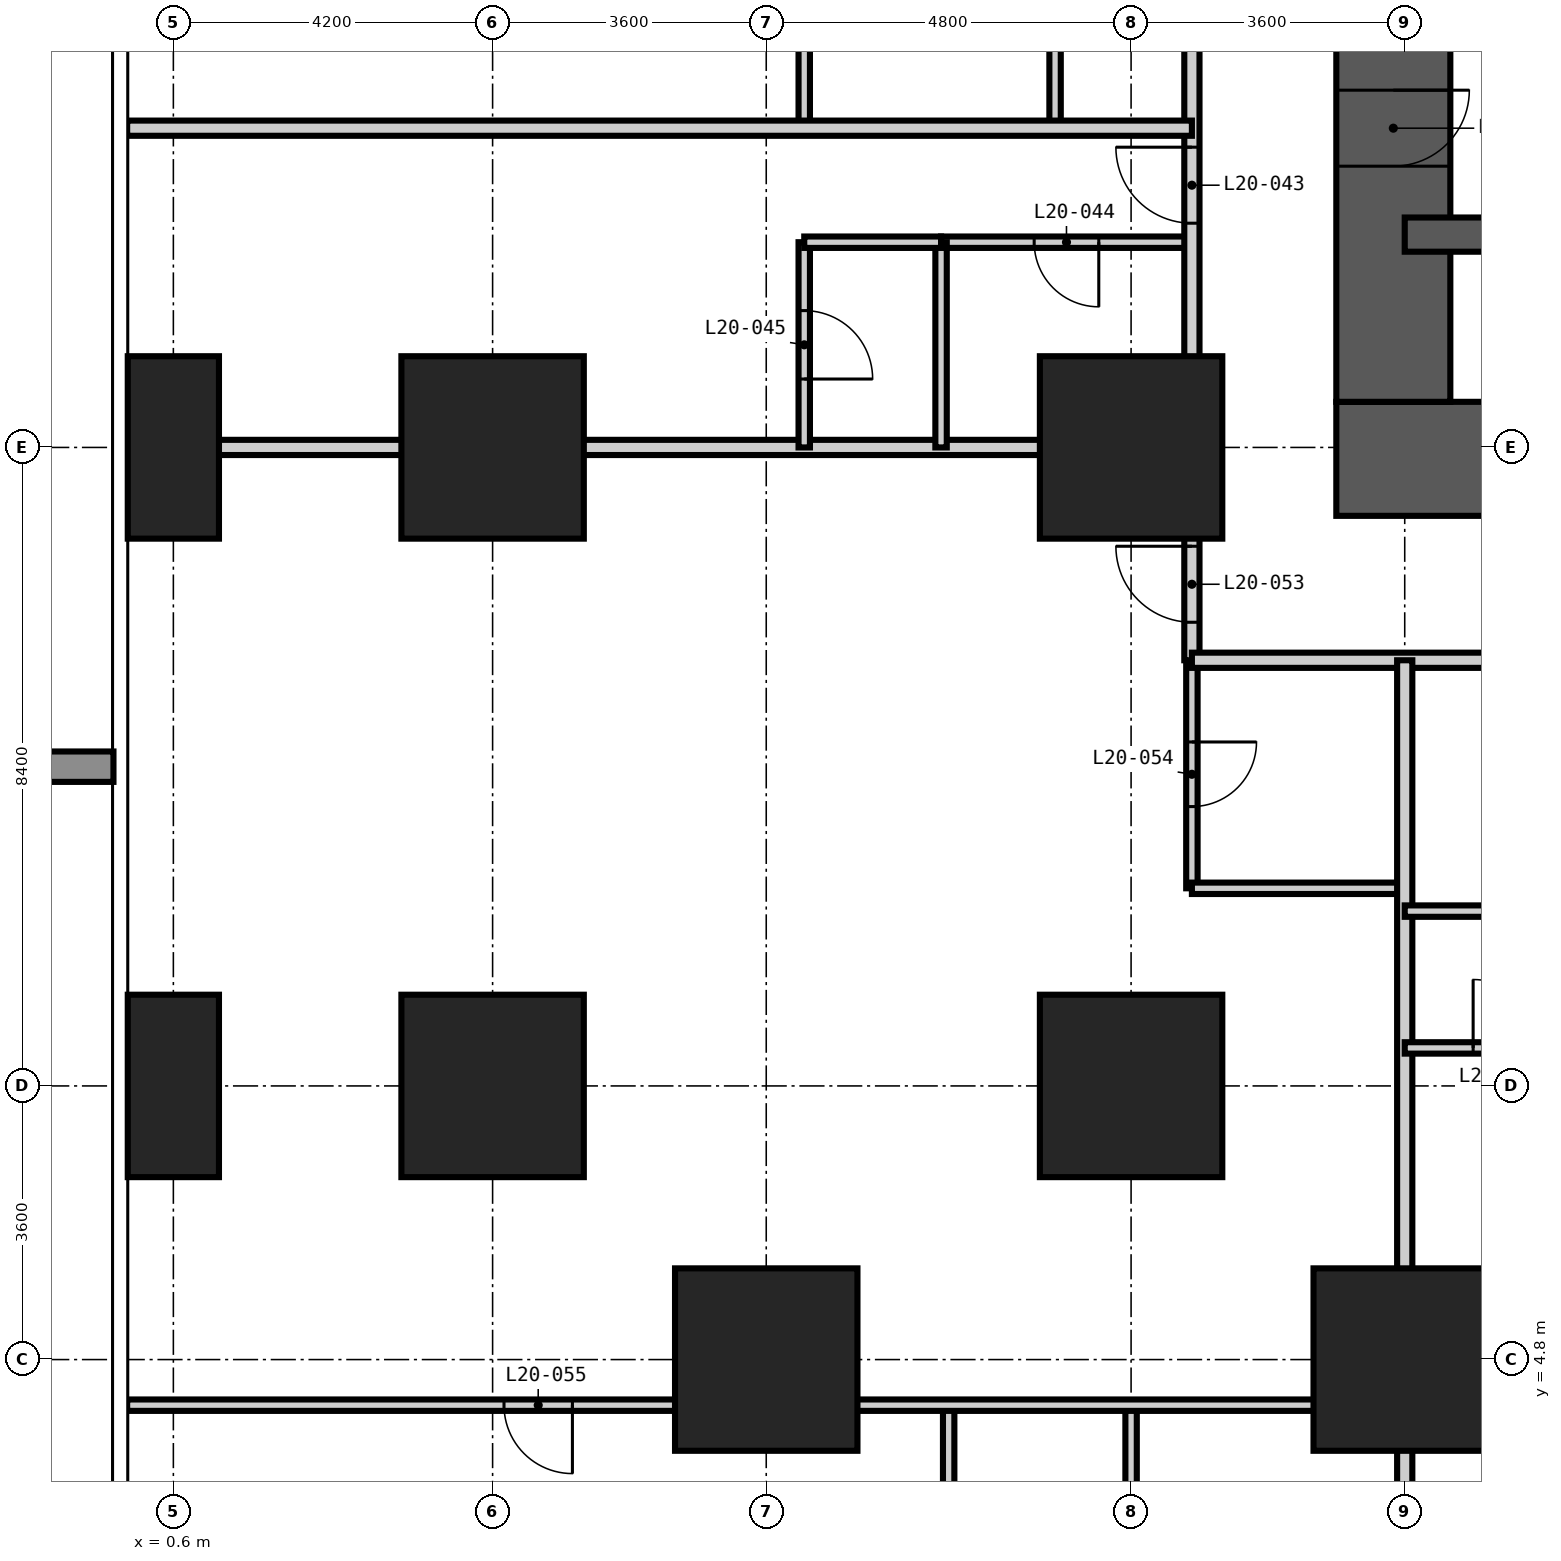
"""IFC4 building model, lengths in metres.
Left out: names, types, materials, properties, quantities, classifications, styles, units other than length and angle.
Written with IfcOpenShell. Run it as: python <this file> out.ifc"""

import sys

from ifc_helpers import new_model, si_unit, direction, frame, frame_2d, origin, origin_2d, place, context, subcontext, project, spatial, rectangle, extrude, element, fill, save


model = new_model("IFC4")
c1 = context("Model", 3, precision=1e-05, world=origin(), true_north=direction((0.0, 1.0)))
c2 = subcontext(c1, "Body", "Model", "MODEL_VIEW")
j1 = project(units=[si_unit("LENGTHUNIT", "METRE"), si_unit("PLANEANGLEUNIT", "RADIAN")], contexts=[c1])
p1 = place(None, origin())
s1 = spatial("IfcSite", under=j1, at=p1, CompositionType="ELEMENT")
p2 = place(p1, origin())
s2 = spatial("IfcBuilding", under=s1, at=p2, CompositionType="ELEMENT")
p3 = place(p2, frame((0.0, 0.0, 81.0)))
s3 = spatial("IfcBuildingStorey", under=s2, at=p3, CompositionType="ELEMENT", Elevation=81.0)
for number, where, z_axis, x_axis in (
    (1, (0.6, 8.4, -0.35), (0.0, 0.0, 1.0), (1.0, 0.0, 0.0)),
    (2, (0.6, 16.8, -0.35), (0.0, 0.0, 1.0), (1.0, 0.0, 0.0)),
):
    element("IfcColumn", number, at=place(p3, frame(where, z_axis=z_axis, x_axis=x_axis)), inside=s3, PredefinedType="COLUMN", context=c2, shape_type="SweptSolid", body=[
        extrude(rectangle(XDim=1.2, YDim=2.4, at=origin_2d()), origin(), (0.0, 0.0, 1.0), 3.6),
    ])
for number, where, z_axis, x_axis in (
    (3, (4.8, 8.4, -0.35), (0.0, 0.0, 1.0), (1.0, 0.0, 0.0)),
    (4, (4.8, 16.8, -0.35), (0.0, 0.0, 1.0), (1.0, 0.0, 0.0)),
    (5, (8.4, 4.8, -0.35), (0.0, 0.0, 1.0), (1.0, 0.0, 0.0)),
    (6, (13.2, 8.4, -0.35), (0.0, 0.0, 1.0), (1.0, 0.0, 0.0)),
    (7, (13.2, 16.8, -0.35), (0.0, 0.0, 1.0), (1.0, 0.0, 0.0)),
    (8, (16.8, 4.8, -0.35), (0.0, 0.0, 1.0), (1.0, 0.0, 0.0)),
):
    element("IfcColumn", number, at=place(p3, frame(where, z_axis=z_axis, x_axis=x_axis)), inside=s3, PredefinedType="COLUMN", context=c2, shape_type="SweptSolid", body=[
        extrude(rectangle(XDim=2.4, YDim=2.4, at=origin_2d()), origin(), (0.0, 0.0, 1.0), 3.6),
    ])
p4 = place(p3, frame((15.9, 16.65, -0.35), z_axis=(0.0, 0.0, 1.0), x_axis=(1.0, 0.0, 0.0)))
e9 = element("IfcWall", 9, at=p4, inside=s3, PredefinedType="SHEAR", context=c2, shape_type="SweptSolid", body=[
    extrude(rectangle(XDim=27.0, YDim=1.5, at=frame_2d((13.5, 0.0))), origin(), (0.0, 0.0, 1.0), 3.6),
])
p5 = place(p4, frame((13.0, 0.0, 0.35)))
e10 = element("IfcOpeningElement", 10, at=p5, cuts=e9, PredefinedType="OPENING", context=c2, shape_type="SweptSolid", body=[
    extrude(rectangle(XDim=1.0, YDim=2.1, at=frame_2d((0.5, 1.05))), frame((0.0, 0.76, 0.0), z_axis=(0.0, -1.0, 0.0), x_axis=(1.0, 0.0, 0.0)), (0.0, 0.0, 1.0), 1.52),
])
p6 = place(p4, frame((19.3, 0.0, 0.35)))
e11 = element("IfcOpeningElement", 11, at=p6, cuts=e9, PredefinedType="OPENING", context=c2, shape_type="SweptSolid", body=[
    extrude(rectangle(XDim=1.0, YDim=2.1, at=frame_2d((0.5, 1.05))), frame((0.0, 0.76, 0.0), z_axis=(0.0, -1.0, 0.0), x_axis=(1.0, 0.0, 0.0)), (0.0, 0.0, 1.0), 1.52),
])
p7 = place(p3, frame((16.65, 41.4, -0.35), z_axis=(0.0, 0.0, 1.0), x_axis=(0.0, -1.0, 0.0)))
e12 = element("IfcWall", 12, at=p7, inside=s3, PredefinedType="SHEAR", context=c2, shape_type="SweptSolid", body=[
    extrude(rectangle(XDim=24.0, YDim=1.5, at=frame_2d((12.0, 0.0))), origin(), (0.0, 0.0, 1.0), 3.6),
])
p8 = place(p7, frame((11.1, 0.0, 0.35)))
e13 = element("IfcOpeningElement", 13, at=p8, cuts=e12, PredefinedType="OPENING", context=c2, shape_type="SweptSolid", body=[
    extrude(rectangle(XDim=1.8, YDim=2.2, at=frame_2d((0.9, 1.1))), frame((0.0, 0.76, 0.0), z_axis=(0.0, -1.0, 0.0), x_axis=(1.0, 0.0, 0.0)), (0.0, 0.0, 1.0), 1.52),
])
p9 = place(p7, frame((19.9, 0.0, 0.35)))
e14 = element("IfcOpeningElement", 14, at=p9, cuts=e12, PredefinedType="OPENING", context=c2, shape_type="SweptSolid", body=[
    extrude(rectangle(XDim=1.0, YDim=2.1, at=frame_2d((0.5, 1.05))), frame((0.0, 0.76, 0.0), z_axis=(0.0, -1.0, 0.0), x_axis=(1.0, 0.0, 0.0)), (0.0, 0.0, 1.0), 1.52),
])
p10 = place(p7, frame((5.2, 0.0, 0.35)))
e15 = element("IfcOpeningElement", 15, at=p10, cuts=e12, PredefinedType="OPENING", context=c2, shape_type="SweptSolid", body=[
    extrude(rectangle(XDim=1.0, YDim=2.1, at=frame_2d((0.5, 1.05))), frame((0.0, 0.76, 0.0), z_axis=(0.0, -1.0, 0.0), x_axis=(1.0, 0.0, 0.0)), (0.0, 0.0, 1.0), 1.52),
])
p11 = place(p3, frame((16.8, 19.6, -0.35), z_axis=(0.0, 0.0, 1.0), x_axis=(1.0, 0.0, 0.0)))
e16 = element("IfcWall", 16, at=p11, inside=s3, PredefinedType="SHEAR", context=c2, shape_type="SweptSolid", body=[
    extrude(rectangle(XDim=8.4, YDim=0.45, at=frame_2d((4.2, 0.0))), origin(), (0.0, 0.0, 1.0), 3.6),
])
for number, where, z_axis, x_axis in (
    (17, (8.9, 21.0, 0.0), (0.0, 0.0, 1.0), (0.0, 1.0, 0.0)),
    (18, (12.2, 21.0, 0.0), (0.0, 0.0, 1.0), (0.0, 1.0, 0.0)),
):
    element("IfcWall", number, at=place(p3, frame(where, z_axis=z_axis, x_axis=x_axis)), inside=s3, PredefinedType="PARTITIONING", context=c2, shape_type="SweptSolid", body=[
        extrude(rectangle(XDim=3.0, YDim=0.15, at=frame_2d((1.5, 0.0))), origin(), (0.0, 0.0, 1.0), 3.25),
    ])
p12 = place(p3, frame((14.0, 11.0, 0.0), z_axis=(0.0, 0.0, 1.0), x_axis=(0.0, 1.0, 0.0)))
e19 = element("IfcWall", 19, at=p12, inside=s3, PredefinedType="PARTITIONING", context=c2, shape_type="SweptSolid", body=[
    extrude(rectangle(XDim=3.0, YDim=0.15, at=frame_2d((1.5, 0.0))), origin(), (0.0, 0.0, 1.0), 3.25),
])
p13 = place(p12, frame((1.075, 0.0, 0.0)))
e20 = element("IfcOpeningElement", 20, at=p13, cuts=e19, PredefinedType="OPENING", context=c2, shape_type="SweptSolid", body=[
    extrude(rectangle(XDim=0.85, YDim=2.1, at=frame_2d((0.425, 1.05))), frame((0.0, 0.085, 0.0), z_axis=(0.0, -1.0, 0.0), x_axis=(1.0, 0.0, 0.0)), (0.0, 0.0, 1.0), 0.17),
])
p14 = place(p3, frame((14.0, 11.0, 0.0), z_axis=(0.0, 0.0, 1.0), x_axis=(1.0, 0.0, 0.0)))
e21 = element("IfcWall", 21, at=p14, inside=s3, PredefinedType="PARTITIONING", context=c2, shape_type="SweptSolid", body=[
    extrude(rectangle(XDim=2.8, YDim=0.15, at=frame_2d((1.4, 0.0))), origin(), (0.0, 0.0, 1.0), 3.25),
])
p15 = place(p3, frame((10.7, 19.5, 0.0), z_axis=(0.0, 0.0, 1.0), x_axis=(1.0, 0.0, 0.0)))
e22 = element("IfcWall", 22, at=p15, inside=s3, PredefinedType="PARTITIONING", context=c2, shape_type="SweptSolid", body=[
    extrude(rectangle(XDim=3.3, YDim=0.15, at=frame_2d((1.65, 0.0))), origin(), (0.0, 0.0, 1.0), 3.25),
])
p16 = place(p15, frame((1.225, 0.0, 0.0)))
e23 = element("IfcOpeningElement", 23, at=p16, cuts=e22, PredefinedType="OPENING", context=c2, shape_type="SweptSolid", body=[
    extrude(rectangle(XDim=0.85, YDim=2.1, at=frame_2d((0.425, 1.05))), frame((0.0, 0.085, 0.0), z_axis=(0.0, -1.0, 0.0), x_axis=(1.0, 0.0, 0.0)), (0.0, 0.0, 1.0), 0.17),
])
p17 = place(p3, frame((14.0, 14.0, 0.0), z_axis=(0.0, 0.0, 1.0), x_axis=(0.0, 1.0, 0.0)))
e24 = element("IfcWall", 24, at=p17, inside=s3, PredefinedType="PARTITIONING", context=c2, shape_type="SweptSolid", body=[
    extrude(rectangle(XDim=32.0, YDim=0.2, at=frame_2d((16.0, 0.0))), origin(), (0.0, 0.0, 1.0), 3.25),
])
p18 = place(p17, frame((5.75, 0.0, 0.0)))
e25 = element("IfcOpeningElement", 25, at=p18, cuts=e24, PredefinedType="OPENING", context=c2, shape_type="SweptSolid", body=[
    extrude(rectangle(XDim=1.0, YDim=2.2, at=frame_2d((0.5, 1.1))), frame((0.0, 0.11, 0.0), z_axis=(0.0, -1.0, 0.0), x_axis=(1.0, 0.0, 0.0)), (0.0, 0.0, 1.0), 0.22),
])
p19 = place(p17, frame((12.5, 0.0, 0.0)))
e26 = element("IfcOpeningElement", 26, at=p19, cuts=e24, PredefinedType="OPENING", context=c2, shape_type="SweptSolid", body=[
    extrude(rectangle(XDim=1.0, YDim=2.2, at=frame_2d((0.5, 1.1))), frame((0.0, 0.11, 0.0), z_axis=(0.0, -1.0, 0.0), x_axis=(1.0, 0.0, 0.0)), (0.0, 0.0, 1.0), 0.22),
])
p20 = place(p17, frame((17.3, 0.0, 0.0)))
e27 = element("IfcOpeningElement", 27, at=p20, cuts=e24, PredefinedType="OPENING", context=c2, shape_type="SweptSolid", body=[
    extrude(rectangle(XDim=1.0, YDim=2.2, at=frame_2d((0.5, 1.1))), frame((0.0, 0.11, 0.0), z_axis=(0.0, -1.0, 0.0), x_axis=(1.0, 0.0, 0.0)), (0.0, 0.0, 1.0), 0.22),
])
p21 = place(p17, frame((24.05, 0.0, 0.0)))
e28 = element("IfcOpeningElement", 28, at=p21, cuts=e24, PredefinedType="OPENING", context=c2, shape_type="SweptSolid", body=[
    extrude(rectangle(XDim=1.0, YDim=2.2, at=frame_2d((0.5, 1.1))), frame((0.0, 0.11, 0.0), z_axis=(0.0, -1.0, 0.0), x_axis=(1.0, 0.0, 0.0)), (0.0, 0.0, 1.0), 0.22),
])
p22 = place(p17, frame((0.5, 0.0, 0.0)))
e29 = element("IfcOpeningElement", 29, at=p22, cuts=e24, PredefinedType="OPENING", context=c2, shape_type="SweptSolid", body=[
    extrude(rectangle(XDim=1.0, YDim=2.2, at=frame_2d((0.5, 1.1))), frame((0.0, 0.11, 0.0), z_axis=(0.0, -1.0, 0.0), x_axis=(1.0, 0.0, 0.0)), (0.0, 0.0, 1.0), 0.22),
])
p23 = place(p17, frame((29.5, 0.0, 0.0)))
e30 = element("IfcOpeningElement", 30, at=p23, cuts=e24, PredefinedType="OPENING", context=c2, shape_type="SweptSolid", body=[
    extrude(rectangle(XDim=1.0, YDim=2.2, at=frame_2d((0.5, 1.1))), frame((0.0, 0.11, 0.0), z_axis=(0.0, -1.0, 0.0), x_axis=(1.0, 0.0, 0.0)), (0.0, 0.0, 1.0), 0.22),
])
p24 = place(p3, frame((45.4, 14.0, 0.0), z_axis=(0.0, 0.0, 1.0), x_axis=(-1.0, 0.0, 0.0)))
e31 = element("IfcWall", 31, at=p24, inside=s3, PredefinedType="PARTITIONING", context=c2, shape_type="SweptSolid", body=[
    extrude(rectangle(XDim=31.4, YDim=0.2, at=frame_2d((15.7, 0.0))), origin(), (0.0, 0.0, 1.0), 3.25),
])
p25 = place(p24, frame((24.65, 0.0, 0.0)))
e32 = element("IfcOpeningElement", 32, at=p25, cuts=e31, PredefinedType="OPENING", context=c2, shape_type="SweptSolid", body=[
    extrude(rectangle(XDim=1.0, YDim=2.2, at=frame_2d((0.5, 1.1))), frame((0.0, 0.11, 0.0), z_axis=(0.0, -1.0, 0.0), x_axis=(1.0, 0.0, 0.0)), (0.0, 0.0, 1.0), 0.22),
])
p26 = place(p24, frame((23.15, 0.0, 0.0)))
e33 = element("IfcOpeningElement", 33, at=p26, cuts=e31, PredefinedType="OPENING", context=c2, shape_type="SweptSolid", body=[
    extrude(rectangle(XDim=1.0, YDim=2.2, at=frame_2d((0.5, 1.1))), frame((0.0, 0.11, 0.0), z_axis=(0.0, -1.0, 0.0), x_axis=(1.0, 0.0, 0.0)), (0.0, 0.0, 1.0), 0.22),
])
p27 = place(p24, frame((13.4, 0.0, 0.0)))
e34 = element("IfcOpeningElement", 34, at=p27, cuts=e31, PredefinedType="OPENING", context=c2, shape_type="SweptSolid", body=[
    extrude(rectangle(XDim=1.0, YDim=2.2, at=frame_2d((0.5, 1.1))), frame((0.0, 0.11, 0.0), z_axis=(0.0, -1.0, 0.0), x_axis=(1.0, 0.0, 0.0)), (0.0, 0.0, 1.0), 0.22),
])
p28 = place(p24, frame((6.35, 0.0, 0.0)))
e35 = element("IfcOpeningElement", 35, at=p28, cuts=e31, PredefinedType="OPENING", context=c2, shape_type="SweptSolid", body=[
    extrude(rectangle(XDim=1.0, YDim=2.2, at=frame_2d((0.5, 1.1))), frame((0.0, 0.11, 0.0), z_axis=(0.0, -1.0, 0.0), x_axis=(1.0, 0.0, 0.0)), (0.0, 0.0, 1.0), 0.22),
])
for number, where, z_axis, x_axis in (
    (36, (16.8, -0.008, 0.0), (0.0, 0.0, 1.0), (0.0, 1.0, 0.0)),
    (37, (-0.008, 16.8, 0.0), (0.0, 0.0, 1.0), (1.0, 0.0, 0.0)),
    (38, (-0.008, 21.0, 0.0), (0.0, 0.0, 1.0), (1.0, 0.0, 0.0)),
):
    element("IfcWall", number, at=place(p3, frame(where, z_axis=z_axis, x_axis=x_axis)), inside=s3, PredefinedType="PARTITIONING", context=c2, shape_type="SweptSolid", body=[
        extrude(rectangle(XDim=14.008, YDim=0.2, at=frame_2d((7.004, 0.0))), origin(), (0.0, 0.0, 1.0), 3.25),
    ])
p29 = place(p3, frame((8.9, 16.8, 0.0), z_axis=(0.0, 0.0, 1.0), x_axis=(0.0, 1.0, 0.0)))
e39 = element("IfcWall", 39, at=p29, inside=s3, PredefinedType="PARTITIONING", context=c2, shape_type="SweptSolid", body=[
    extrude(rectangle(XDim=2.7, YDim=0.15, at=frame_2d((1.35, 0.0))), origin(), (0.0, 0.0, 1.0), 3.25),
])
p30 = place(p29, frame((0.9, 0.0, 0.0)))
e40 = element("IfcOpeningElement", 40, at=p30, cuts=e39, PredefinedType="OPENING", context=c2, shape_type="SweptSolid", body=[
    extrude(rectangle(XDim=0.9, YDim=2.1, at=frame_2d((0.45, 1.05))), frame((0.0, 0.085, 0.0), z_axis=(0.0, -1.0, 0.0), x_axis=(1.0, 0.0, 0.0)), (0.0, 0.0, 1.0), 0.17),
])
p31 = place(p3, frame((10.7, 16.8, 0.0), z_axis=(0.0, 0.0, 1.0), x_axis=(0.0, 1.0, 0.0)))
e41 = element("IfcWall", 41, at=p31, inside=s3, PredefinedType="PARTITIONING", context=c2, shape_type="SweptSolid", body=[
    extrude(rectangle(XDim=2.7, YDim=0.15, at=frame_2d((1.35, 0.0))), origin(), (0.0, 0.0, 1.0), 3.25),
])
p32 = place(p3, frame((10.8, 1.2, 0.0), z_axis=(0.0, 0.0, 1.0), x_axis=(0.0, 1.0, 0.0)))
e42 = element("IfcWall", 42, at=p32, inside=s3, PredefinedType="PARTITIONING", context=c2, shape_type="SweptSolid", body=[
    extrude(rectangle(XDim=3.0, YDim=0.15, at=frame_2d((1.5, 0.0))), origin(), (0.0, 0.0, 1.0), 3.25),
])
p33 = place(p32, frame((1.05, 0.0, 0.0)))
e43 = element("IfcOpeningElement", 43, at=p33, cuts=e42, PredefinedType="OPENING", context=c2, shape_type="SweptSolid", body=[
    extrude(rectangle(XDim=0.9, YDim=2.1, at=frame_2d((0.45, 1.05))), frame((0.0, 0.085, 0.0), z_axis=(0.0, -1.0, 0.0), x_axis=(1.0, 0.0, 0.0)), (0.0, 0.0, 1.0), 0.17),
])
p34 = place(p3, frame((13.2, 1.2, 0.0), z_axis=(0.0, 0.0, 1.0), x_axis=(0.0, 1.0, 0.0)))
e44 = element("IfcWall", 44, at=p34, inside=s3, PredefinedType="PARTITIONING", context=c2, shape_type="SweptSolid", body=[
    extrude(rectangle(XDim=3.0, YDim=0.15, at=frame_2d((1.5, 0.0))), origin(), (0.0, 0.0, 1.0), 3.25),
])
p35 = place(p3, frame((-0.008, 4.2, 0.0), z_axis=(0.0, 0.0, 1.0), x_axis=(1.0, 0.0, 0.0)))
e45 = element("IfcWall", 45, at=p35, inside=s3, PredefinedType="PARTITIONING", context=c2, shape_type="SweptSolid", body=[
    extrude(rectangle(XDim=16.808, YDim=0.15, at=frame_2d((8.404, 0.0))), origin(), (0.0, 0.0, 1.0), 3.25),
])
p36 = place(p35, frame((4.958, 0.0, 0.0)))
e46 = element("IfcOpeningElement", 46, at=p36, cuts=e45, PredefinedType="OPENING", context=c2, shape_type="SweptSolid", body=[
    extrude(rectangle(XDim=0.9, YDim=2.1, at=frame_2d((0.45, 1.05))), frame((0.0, 0.085, 0.0), z_axis=(0.0, -1.0, 0.0), x_axis=(1.0, 0.0, 0.0)), (0.0, 0.0, 1.0), 0.17),
])
p37 = place(p3, frame((16.8, 8.9, 0.0), z_axis=(0.0, 0.0, 1.0), x_axis=(1.0, 0.0, 0.0)))
e47 = element("IfcWall", 47, at=p37, inside=s3, PredefinedType="PARTITIONING", context=c2, shape_type="SweptSolid", body=[
    extrude(rectangle(XDim=2.7, YDim=0.15, at=frame_2d((1.35, 0.0))), origin(), (0.0, 0.0, 1.0), 3.25),
])
p38 = place(p37, frame((0.9, 0.0, 0.0)))
e48 = element("IfcOpeningElement", 48, at=p38, cuts=e47, PredefinedType="OPENING", context=c2, shape_type="SweptSolid", body=[
    extrude(rectangle(XDim=0.9, YDim=2.1, at=frame_2d((0.45, 1.05))), frame((0.0, 0.085, 0.0), z_axis=(0.0, -1.0, 0.0), x_axis=(1.0, 0.0, 0.0)), (0.0, 0.0, 1.0), 0.17),
])
p39 = place(p3, frame((16.8, 10.7, 0.0), z_axis=(0.0, 0.0, 1.0), x_axis=(1.0, 0.0, 0.0)))
e49 = element("IfcWall", 49, at=p39, inside=s3, PredefinedType="PARTITIONING", context=c2, shape_type="SweptSolid", body=[
    extrude(rectangle(XDim=2.7, YDim=0.15, at=frame_2d((1.35, 0.0))), origin(), (0.0, 0.0, 1.0), 3.25),
])
p40 = place(p3, frame((8.9, 19.5, 0.0), z_axis=(0.0, 0.0, 1.0), x_axis=(1.0, 0.0, 0.0)))
e50 = element("IfcWall", 50, at=p40, inside=s3, PredefinedType="PARTITIONING", context=c2, shape_type="SweptSolid", body=[
    extrude(rectangle(XDim=1.8, YDim=0.15, at=frame_2d((0.9, 0.0))), origin(), (0.0, 0.0, 1.0), 3.25),
])
p41 = place(p38, origin())
e51 = element("IfcDoor", 51, at=p41, inside=s3, OperationType="SINGLE_SWING_LEFT", PredefinedType="DOOR", context=c2, shape_type="SweptSolid", body=[
    extrude(rectangle(XDim=0.9, YDim=2.1, at=frame_2d((0.45, 1.05))), frame((0.0, 0.025, 0.0), z_axis=(0.0, -1.0, 0.0), x_axis=(1.0, 0.0, 0.0)), (0.0, 0.0, 1.0), 0.05),
])
fill(e48, e51)
p42 = place(p18, origin())
e52 = element("IfcDoor", 52, at=p42, inside=s3, OperationType="SINGLE_SWING_RIGHT", PredefinedType="DOOR", context=c2, shape_type="SweptSolid", body=[
    extrude(rectangle(XDim=1.0, YDim=2.2, at=frame_2d((0.5, 1.1))), frame((0.0, 0.025, 0.0), z_axis=(0.0, -1.0, 0.0), x_axis=(1.0, 0.0, 0.0)), (0.0, 0.0, 1.0), 0.05),
])
fill(e25, e52)
p43 = place(p16, frame((0.85, 0.0, 0.0), z_axis=(0.0, 0.0, 1.0), x_axis=(-1.0, 0.0, 0.0)))
e53 = element("IfcDoor", 53, at=p43, inside=s3, OperationType="SINGLE_SWING_LEFT", PredefinedType="DOOR", context=c2, shape_type="SweptSolid", body=[
    extrude(rectangle(XDim=0.85, YDim=2.1, at=frame_2d((0.425, 1.05))), frame((0.0, 0.025, 0.0), z_axis=(0.0, -1.0, 0.0), x_axis=(1.0, 0.0, 0.0)), (0.0, 0.0, 1.0), 0.05),
])
fill(e23, e53)
p44 = place(p30, frame((0.9, 0.0, 0.0), z_axis=(0.0, 0.0, 1.0), x_axis=(-1.0, 0.0, 0.0)))
e54 = element("IfcDoor", 54, at=p44, inside=s3, OperationType="SINGLE_SWING_RIGHT", PredefinedType="DOOR", context=c2, shape_type="SweptSolid", body=[
    extrude(rectangle(XDim=0.9, YDim=2.1, at=frame_2d((0.45, 1.05))), frame((0.0, 0.025, 0.0), z_axis=(0.0, -1.0, 0.0), x_axis=(1.0, 0.0, 0.0)), (0.0, 0.0, 1.0), 0.05),
])
fill(e40, e54)
p45 = place(p22, origin())
e55 = element("IfcDoor", 55, at=p45, inside=s3, OperationType="SINGLE_SWING_RIGHT", PredefinedType="DOOR", context=c2, shape_type="SweptSolid", body=[
    extrude(rectangle(XDim=1.0, YDim=2.2, at=frame_2d((0.5, 1.1))), frame((0.0, 0.025, 0.0), z_axis=(0.0, -1.0, 0.0), x_axis=(1.0, 0.0, 0.0)), (0.0, 0.0, 1.0), 0.05),
])
fill(e29, e55)
p46 = place(p13, frame((0.85, 0.0, 0.0), z_axis=(0.0, 0.0, 1.0), x_axis=(-1.0, 0.0, 0.0)))
e56 = element("IfcDoor", 56, at=p46, inside=s3, OperationType="SINGLE_SWING_LEFT", PredefinedType="DOOR", context=c2, shape_type="SweptSolid", body=[
    extrude(rectangle(XDim=0.85, YDim=2.1, at=frame_2d((0.425, 1.05))), frame((0.0, 0.025, 0.0), z_axis=(0.0, -1.0, 0.0), x_axis=(1.0, 0.0, 0.0)), (0.0, 0.0, 1.0), 0.05),
])
fill(e20, e56)
p47 = place(p36, frame((0.9, 0.0, 0.0), z_axis=(0.0, 0.0, 1.0), x_axis=(-1.0, 0.0, 0.0)))
e57 = element("IfcDoor", 57, at=p47, inside=s3, OperationType="SINGLE_SWING_LEFT", PredefinedType="DOOR", context=c2, shape_type="SweptSolid", body=[
    extrude(rectangle(XDim=0.9, YDim=2.1, at=frame_2d((0.45, 1.05))), frame((0.0, 0.025, 0.0), z_axis=(0.0, -1.0, 0.0), x_axis=(1.0, 0.0, 0.0)), (0.0, 0.0, 1.0), 0.05),
])
fill(e46, e57)
p48 = place(p9, origin())
e58 = element("IfcDoor", 58, at=p48, inside=s3, OperationType="SINGLE_SWING_LEFT", PredefinedType="DOOR", context=c2, shape_type="SweptSolid", body=[
    extrude(rectangle(XDim=1.0, YDim=2.1, at=frame_2d((0.5, 1.05))), frame((0.0, 0.025, 0.0), z_axis=(0.0, -1.0, 0.0), x_axis=(1.0, 0.0, 0.0)), (0.0, 0.0, 1.0), 0.05),
])
fill(e14, e58)
save(model, sys.argv[1])
